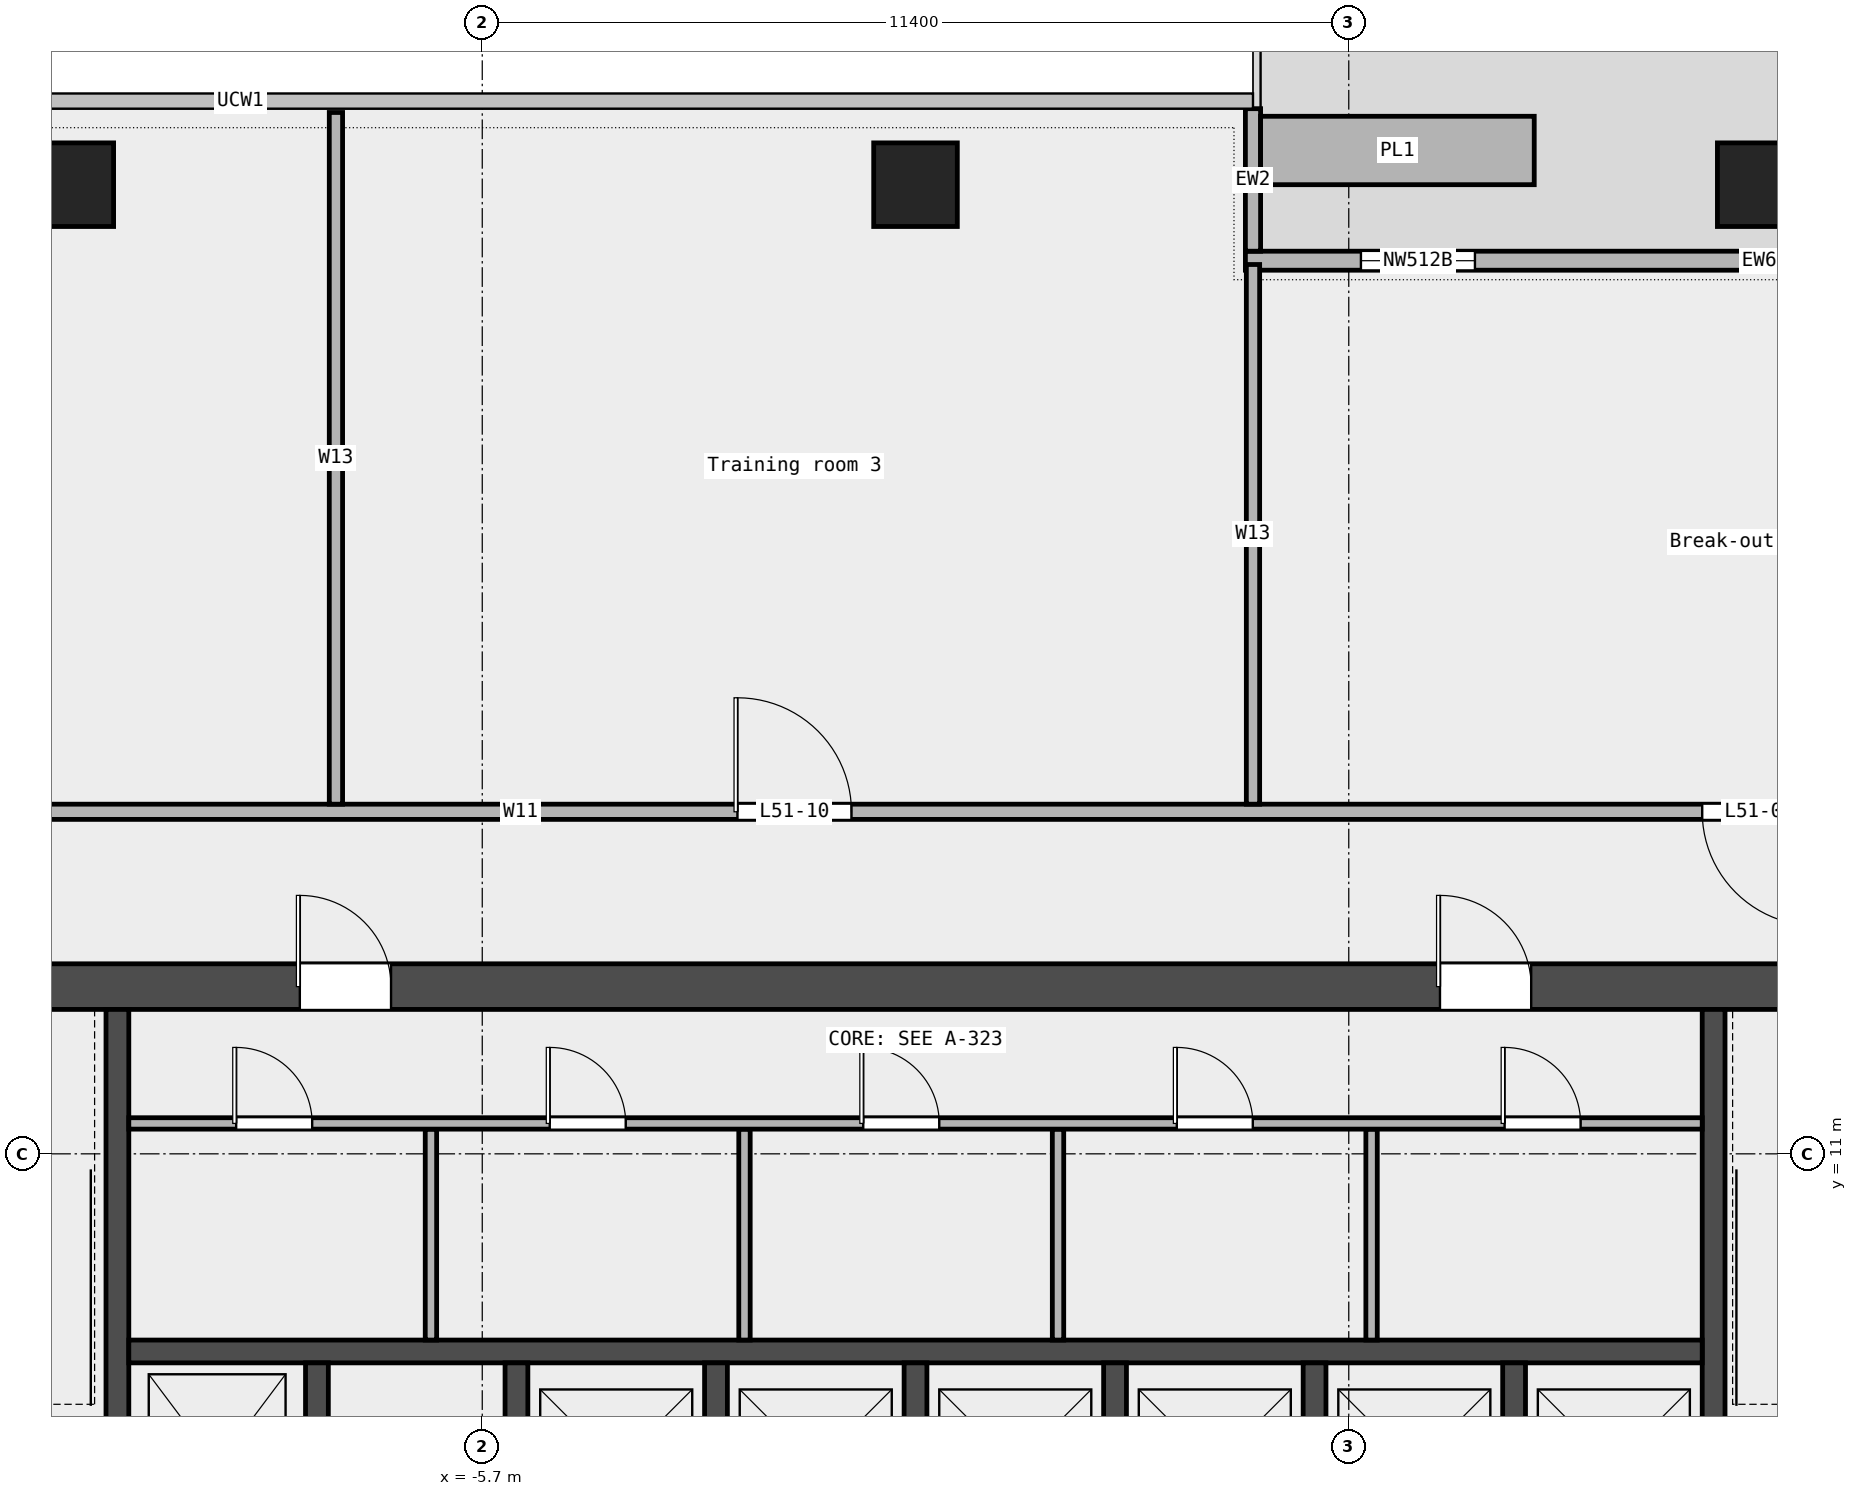
"""IFC4 building model, lengths in metres.
Left out: names, types, materials, properties, quantities, classifications, styles, units other than length and angle.
Written with IfcOpenShell. Run it as: python <this file> out.ifc"""

import sys

from ifc_helpers import new_model, si_unit, direction, frame, frame_2d, origin, origin_2d, place, context, subcontext, project, spatial, rectangle, extrude, element, fill, save


model = new_model("IFC4")
c1 = context("Model", 3, precision=1e-05, world=origin(), true_north=direction((0.0, 1.0)))
c2 = subcontext(c1, "Body", "Model", "MODEL_VIEW")
j1 = project(units=[si_unit("LENGTHUNIT", "METRE"), si_unit("PLANEANGLEUNIT", "RADIAN")], contexts=[c1])
p1 = place(None, origin())
s1 = spatial("IfcSite", under=j1, at=p1, CompositionType="ELEMENT")
p2 = place(p1, origin())
s2 = spatial("IfcBuilding", under=s1, at=p2, CompositionType="ELEMENT")
p3 = place(p2, frame((0.0, 0.0, 239.0)))
s3 = spatial("IfcBuildingStorey", under=s2, at=p3, CompositionType="ELEMENT", Elevation=239.0)
for number, where, z_axis, x_axis in (
    (1, (11.1, 23.75, 0.0), (0.0, 0.0, 1.0), (1.0, 0.0, 0.0)),
    (2, (0.0, 23.75, 0.0), (0.0, 0.0, 1.0), (1.0, 0.0, 0.0)),
    (3, (-11.1, 23.75, 0.0), (0.0, 0.0, 1.0), (1.0, 0.0, 0.0)),
):
    element("IfcColumn", number, at=place(p3, frame(where, z_axis=z_axis, x_axis=x_axis)), inside=s3, PredefinedType="COLUMN", context=c2, shape_type="SweptSolid", body=[
        extrude(rectangle(XDim=1.1, YDim=1.1, at=origin_2d()), origin(), (0.0, 0.0, 1.0), 3.6),
    ])
p4 = place(p3, frame((17.86, 22.75, 0.0), z_axis=(0.0, 0.0, 1.0), x_axis=(-1.0, 0.0, 0.0)))
e4 = element("IfcWall", 4, at=p4, inside=s3, PredefinedType="STANDARD", context=c2, shape_type="SweptSolid", body=[
    extrude(rectangle(XDim=13.52, YDim=0.25, at=frame_2d((6.76, 0.0))), origin(), (0.0, 0.0, 1.0), 3.6),
])
p5 = place(p4, frame((1.5, 0.0, 0.45)))
e5 = element("IfcOpeningElement", 5, at=p5, cuts=e4, PredefinedType="OPENING", context=c2, shape_type="SweptSolid", body=[
    extrude(rectangle(XDim=1.5, YDim=2.4, at=frame_2d((0.75, 1.2))), frame((0.0, 0.137, 0.0), z_axis=(0.0, -1.0, 0.0), x_axis=(1.0, 0.0, 0.0)), (0.0, 0.0, 1.0), 0.274),
])
p6 = place(p4, frame((4.0, 0.0, 0.0)))
e6 = element("IfcOpeningElement", 6, at=p6, cuts=e4, PredefinedType="OPENING", context=c2, shape_type="SweptSolid", body=[
    extrude(rectangle(XDim=1.8, YDim=2.4, at=frame_2d((0.9, 1.2))), frame((0.0, 0.137, 0.0), z_axis=(0.0, -1.0, 0.0), x_axis=(1.0, 0.0, 0.0)), (0.0, 0.0, 1.0), 0.274),
])
p7 = place(p4, frame((10.5, 0.0, 0.45)))
e7 = element("IfcOpeningElement", 7, at=p7, cuts=e4, PredefinedType="OPENING", context=c2, shape_type="SweptSolid", body=[
    extrude(rectangle(XDim=1.5, YDim=2.4, at=frame_2d((0.75, 1.2))), frame((0.0, 0.137, 0.0), z_axis=(0.0, -1.0, 0.0), x_axis=(1.0, 0.0, 0.0)), (0.0, 0.0, 1.0), 0.274),
])
p8 = place(p3, frame((4.44, 24.75, 0.0), z_axis=(0.0, 0.0, 1.0), x_axis=(0.0, -1.0, 0.0)))
e8 = element("IfcWall", 8, at=p8, inside=s3, PredefinedType="STANDARD", context=c2, shape_type="SweptSolid", body=[
    extrude(rectangle(XDim=1.875, YDim=0.2, at=frame_2d((0.938, 0.0))), origin(), (0.0, 0.0, 1.0), 3.6),
])
p9 = place(p3, frame((8.14, 24.2, 0.0), z_axis=(0.0, 0.0, 1.0), x_axis=(-1.0, 0.0, 0.0)))
e9 = element("IfcWall", 9, at=p9, inside=s3, PredefinedType="STANDARD", context=c2, shape_type="SweptSolid", body=[
    extrude(rectangle(XDim=3.6, YDim=0.9, at=frame_2d((1.8, 0.0))), origin(), (0.0, 0.0, 1.0), 0.7),
])
p10 = place(p3, frame((-28.15, 15.5, 0.0), z_axis=(0.0, 0.0, 1.0), x_axis=(1.0, 0.0, 0.0)))
e10 = element("IfcWall", 10, at=p10, inside=s3, PredefinedType="PARTITIONING", context=c2, shape_type="SweptSolid", body=[
    extrude(rectangle(XDim=45.91, YDim=0.2, at=frame_2d((22.955, 0.0))), origin(), (0.0, 0.0, 1.0), 3.6),
])
p11 = place(p10, frame((38.5, 0.0, 0.0)))
e11 = element("IfcOpeningElement", 11, at=p11, cuts=e10, PredefinedType="OPENING", context=c2, shape_type="SweptSolid", body=[
    extrude(rectangle(XDim=1.5, YDim=2.1, at=frame_2d((0.75, 1.05))), frame((0.0, 0.112, 0.0), z_axis=(0.0, -1.0, 0.0), x_axis=(1.0, 0.0, 0.0)), (0.0, 0.0, 1.0), 0.224),
])
p12 = place(p10, frame((9.462, 0.0, 0.0)))
e12 = element("IfcOpeningElement", 12, at=p12, cuts=e10, PredefinedType="OPENING", context=c2, shape_type="SweptSolid", body=[
    extrude(rectangle(XDim=1.8, YDim=2.1, at=frame_2d((0.9, 1.05))), frame((0.0, 0.112, 0.0), z_axis=(0.0, -1.0, 0.0), x_axis=(1.0, 0.0, 0.0)), (0.0, 0.0, 1.0), 0.224),
])
p13 = place(p10, frame((25.808, 0.0, 0.0)))
e13 = element("IfcOpeningElement", 13, at=p13, cuts=e10, PredefinedType="OPENING", context=c2, shape_type="SweptSolid", body=[
    extrude(rectangle(XDim=1.5, YDim=2.1, at=frame_2d((0.75, 1.05))), frame((0.0, 0.112, 0.0), z_axis=(0.0, -1.0, 0.0), x_axis=(1.0, 0.0, 0.0)), (0.0, 0.0, 1.0), 0.224),
])
p14 = place(p3, frame((-7.625, 15.6, 0.0), z_axis=(0.0, 0.0, 1.0), x_axis=(0.0, 1.0, 0.0)))
e14 = element("IfcWall", 14, at=p14, inside=s3, PredefinedType="PARTITIONING", context=c2, shape_type="SweptSolid", body=[
    extrude(rectangle(XDim=9.1, YDim=0.175, at=frame_2d((4.55, 0.0))), origin(), (0.0, 0.0, 1.0), 3.6),
])
p15 = place(p3, frame((4.44, 15.6, 0.0), z_axis=(0.0, 0.0, 1.0), x_axis=(0.0, 1.0, 0.0)))
e15 = element("IfcWall", 15, at=p15, inside=s3, PredefinedType="PARTITIONING", context=c2, shape_type="SweptSolid", body=[
    extrude(rectangle(XDim=7.1, YDim=0.175, at=frame_2d((3.55, 0.0))), origin(), (0.0, 0.0, 1.0), 3.6),
])
p16 = place(p3, frame((-14.4, 13.2, 0.0), z_axis=(0.0, 0.0, 1.0), x_axis=(1.0, 0.0, 0.0)))
e16 = element("IfcWall", 16, at=p16, inside=s3, PredefinedType="SHEAR", context=c2, shape_type="SweptSolid", body=[
    extrude(rectangle(XDim=28.8, YDim=0.6, at=frame_2d((14.4, 0.0))), origin(), (0.0, 0.0, 1.0), 3.7),
])
p17 = place(p16, frame((6.3, 0.0, 0.0)))
e17 = element("IfcOpeningElement", 17, at=p17, cuts=e16, PredefinedType="OPENING", context=c2, shape_type="SweptSolid", body=[
    extrude(rectangle(XDim=1.2, YDim=2.1, at=frame_2d((0.6, 1.05))), frame((0.0, 0.312, 0.0), z_axis=(0.0, -1.0, 0.0), x_axis=(1.0, 0.0, 0.0)), (0.0, 0.0, 1.0), 0.624),
])
p18 = place(p16, frame((21.3, 0.0, 0.0)))
e18 = element("IfcOpeningElement", 18, at=p18, cuts=e16, PredefinedType="OPENING", context=c2, shape_type="SweptSolid", body=[
    extrude(rectangle(XDim=1.2, YDim=2.1, at=frame_2d((0.6, 1.05))), frame((0.0, 0.312, 0.0), z_axis=(0.0, -1.0, 0.0), x_axis=(1.0, 0.0, 0.0)), (0.0, 0.0, 1.0), 0.624),
])
for number, where, z_axis, x_axis in (
    (19, (-10.5, 5.25, 0.0), (0.0, 0.0, 1.0), (0.0, 1.0, 0.0)),
    (20, (10.5, 5.25, 0.0), (0.0, 0.0, 1.0), (0.0, 1.0, 0.0)),
):
    element("IfcWall", number, at=place(p3, frame(where, z_axis=z_axis, x_axis=x_axis)), inside=s3, PredefinedType="SHEAR", context=c2, shape_type="SweptSolid", body=[
        extrude(rectangle(XDim=7.65, YDim=0.3, at=frame_2d((3.825, 0.0))), origin(), (0.0, 0.0, 1.0), 3.7),
    ])
p19 = place(p3, frame((-10.35, 8.4, 0.0), z_axis=(0.0, 0.0, 1.0), x_axis=(1.0, 0.0, 0.0)))
e21 = element("IfcWall", 21, at=p19, inside=s3, PredefinedType="SOLIDWALL", context=c2, shape_type="SweptSolid", body=[
    extrude(rectangle(XDim=20.7, YDim=0.3, at=frame_2d((10.35, 0.0))), origin(), (0.0, 0.0, 1.0), 3.7),
])
for number, where, z_axis, x_axis in (
    (22, (-7.875, 5.55, 0.0), (0.0, 0.0, 1.0), (0.0, 1.0, 0.0)),
    (23, (-5.25, 5.55, 0.0), (0.0, 0.0, 1.0), (0.0, 1.0, 0.0)),
    (24, (-2.625, 5.55, 0.0), (0.0, 0.0, 1.0), (0.0, 1.0, 0.0)),
    (25, (0.0, 5.55, 0.0), (0.0, 0.0, 1.0), (0.0, 1.0, 0.0)),
    (26, (2.625, 5.55, 0.0), (0.0, 0.0, 1.0), (0.0, 1.0, 0.0)),
    (27, (5.25, 5.55, 0.0), (0.0, 0.0, 1.0), (0.0, 1.0, 0.0)),
    (28, (7.875, 5.55, 0.0), (0.0, 0.0, 1.0), (0.0, 1.0, 0.0)),
):
    element("IfcWall", number, at=place(p3, frame(where, z_axis=z_axis, x_axis=x_axis)), inside=s3, PredefinedType="SOLIDWALL", context=c2, shape_type="SweptSolid", body=[
        extrude(rectangle(XDim=2.7, YDim=0.3, at=frame_2d((1.35, 0.0))), origin(), (0.0, 0.0, 1.0), 3.7),
    ])
for number, where, z_axis, x_axis in (
    (29, (-6.375, 8.55, 0.0), (0.0, 0.0, 1.0), (0.0, 1.0, 0.0)),
    (30, (-2.25, 8.55, 0.0), (0.0, 0.0, 1.0), (0.0, 1.0, 0.0)),
    (31, (1.875, 8.55, 0.0), (0.0, 0.0, 1.0), (0.0, 1.0, 0.0)),
    (32, (6.0, 8.55, 0.0), (0.0, 0.0, 1.0), (0.0, 1.0, 0.0)),
):
    element("IfcWall", number, at=place(p3, frame(where, z_axis=z_axis, x_axis=x_axis)), inside=s3, PredefinedType="PARTITIONING", context=c2, shape_type="SweptSolid", body=[
        extrude(rectangle(XDim=2.775, YDim=0.15, at=frame_2d((1.387, 0.0))), origin(), (0.0, 0.0, 1.0), 3.7),
    ])
p20 = place(p3, frame((-10.35, 11.4, 0.0), z_axis=(0.0, 0.0, 1.0), x_axis=(1.0, 0.0, 0.0)))
e33 = element("IfcWall", 33, at=p20, inside=s3, PredefinedType="PARTITIONING", context=c2, shape_type="SweptSolid", body=[
    extrude(rectangle(XDim=20.7, YDim=0.15, at=frame_2d((10.35, 0.0))), origin(), (0.0, 0.0, 1.0), 3.7),
])
p21 = place(p20, frame((1.413, 0.0, 0.0)))
e34 = element("IfcOpeningElement", 34, at=p21, cuts=e33, PredefinedType="OPENING", context=c2, shape_type="SweptSolid", body=[
    extrude(rectangle(XDim=1.0, YDim=2.1, at=frame_2d((0.5, 1.05))), frame((0.0, 0.087, 0.0), z_axis=(0.0, -1.0, 0.0), x_axis=(1.0, 0.0, 0.0)), (0.0, 0.0, 1.0), 0.174),
])
p22 = place(p20, frame((5.538, 0.0, 0.0)))
e35 = element("IfcOpeningElement", 35, at=p22, cuts=e33, PredefinedType="OPENING", context=c2, shape_type="SweptSolid", body=[
    extrude(rectangle(XDim=1.0, YDim=2.1, at=frame_2d((0.5, 1.05))), frame((0.0, 0.087, 0.0), z_axis=(0.0, -1.0, 0.0), x_axis=(1.0, 0.0, 0.0)), (0.0, 0.0, 1.0), 0.174),
])
p23 = place(p20, frame((9.663, 0.0, 0.0)))
e36 = element("IfcOpeningElement", 36, at=p23, cuts=e33, PredefinedType="OPENING", context=c2, shape_type="SweptSolid", body=[
    extrude(rectangle(XDim=1.0, YDim=2.1, at=frame_2d((0.5, 1.05))), frame((0.0, 0.087, 0.0), z_axis=(0.0, -1.0, 0.0), x_axis=(1.0, 0.0, 0.0)), (0.0, 0.0, 1.0), 0.174),
])
p24 = place(p20, frame((13.788, 0.0, 0.0)))
e37 = element("IfcOpeningElement", 37, at=p24, cuts=e33, PredefinedType="OPENING", context=c2, shape_type="SweptSolid", body=[
    extrude(rectangle(XDim=1.0, YDim=2.1, at=frame_2d((0.5, 1.05))), frame((0.0, 0.087, 0.0), z_axis=(0.0, -1.0, 0.0), x_axis=(1.0, 0.0, 0.0)), (0.0, 0.0, 1.0), 0.174),
])
p25 = place(p20, frame((18.1, 0.0, 0.0)))
e38 = element("IfcOpeningElement", 38, at=p25, cuts=e33, PredefinedType="OPENING", context=c2, shape_type="SweptSolid", body=[
    extrude(rectangle(XDim=1.0, YDim=2.1, at=frame_2d((0.5, 1.05))), frame((0.0, 0.087, 0.0), z_axis=(0.0, -1.0, 0.0), x_axis=(1.0, 0.0, 0.0)), (0.0, 0.0, 1.0), 0.174),
])
p26 = place(p7, origin())
e39 = element("IfcWindow", 39, at=p26, inside=s3, PartitioningType="SINGLE_PANEL", PredefinedType="WINDOW", context=c2, shape_type="SweptSolid", body=[
    extrude(rectangle(XDim=1.5, YDim=2.4, at=frame_2d((0.75, 1.2))), frame((0.0, 0.03, 0.0), z_axis=(0.0, -1.0, 0.0), x_axis=(1.0, 0.0, 0.0)), (0.0, 0.0, 1.0), 0.06),
])
fill(e7, e39)
p27 = place(p11, origin())
e40 = element("IfcDoor", 40, at=p27, inside=s3, OperationType="DOUBLE_DOOR_SINGLE_SWING", PredefinedType="DOOR", context=c2, shape_type="SweptSolid", body=[
    extrude(rectangle(XDim=1.5, YDim=2.1, at=frame_2d((0.75, 1.05))), frame((0.0, 0.025, 0.0), z_axis=(0.0, -1.0, 0.0), x_axis=(1.0, 0.0, 0.0)), (0.0, 0.0, 1.0), 0.05),
])
fill(e11, e40)
p28 = place(p13, origin())
e41 = element("IfcDoor", 41, at=p28, inside=s3, OperationType="DOUBLE_DOOR_SINGLE_SWING", PredefinedType="DOOR", context=c2, shape_type="SweptSolid", body=[
    extrude(rectangle(XDim=1.5, YDim=2.1, at=frame_2d((0.75, 1.05))), frame((0.0, 0.025, 0.0), z_axis=(0.0, -1.0, 0.0), x_axis=(1.0, 0.0, 0.0)), (0.0, 0.0, 1.0), 0.05),
])
fill(e13, e41)
p29 = place(p21, origin())
e42 = element("IfcDoor", 42, at=p29, inside=s3, OperationType="SINGLE_SWING_LEFT", PredefinedType="DOOR", context=c2, shape_type="SweptSolid", body=[
    extrude(rectangle(XDim=1.0, YDim=2.1, at=frame_2d((0.5, 1.05))), frame((0.0, 0.025, 0.0), z_axis=(0.0, -1.0, 0.0), x_axis=(1.0, 0.0, 0.0)), (0.0, 0.0, 1.0), 0.05),
])
fill(e34, e42)
p30 = place(p22, origin())
e43 = element("IfcDoor", 43, at=p30, inside=s3, OperationType="SINGLE_SWING_LEFT", PredefinedType="DOOR", context=c2, shape_type="SweptSolid", body=[
    extrude(rectangle(XDim=1.0, YDim=2.1, at=frame_2d((0.5, 1.05))), frame((0.0, 0.025, 0.0), z_axis=(0.0, -1.0, 0.0), x_axis=(1.0, 0.0, 0.0)), (0.0, 0.0, 1.0), 0.05),
])
fill(e35, e43)
p31 = place(p23, origin())
e44 = element("IfcDoor", 44, at=p31, inside=s3, OperationType="SINGLE_SWING_LEFT", PredefinedType="DOOR", context=c2, shape_type="SweptSolid", body=[
    extrude(rectangle(XDim=1.0, YDim=2.1, at=frame_2d((0.5, 1.05))), frame((0.0, 0.025, 0.0), z_axis=(0.0, -1.0, 0.0), x_axis=(1.0, 0.0, 0.0)), (0.0, 0.0, 1.0), 0.05),
])
fill(e36, e44)
p32 = place(p24, origin())
e45 = element("IfcDoor", 45, at=p32, inside=s3, OperationType="SINGLE_SWING_LEFT", PredefinedType="DOOR", context=c2, shape_type="SweptSolid", body=[
    extrude(rectangle(XDim=1.0, YDim=2.1, at=frame_2d((0.5, 1.05))), frame((0.0, 0.025, 0.0), z_axis=(0.0, -1.0, 0.0), x_axis=(1.0, 0.0, 0.0)), (0.0, 0.0, 1.0), 0.05),
])
fill(e37, e45)
p33 = place(p25, origin())
e46 = element("IfcDoor", 46, at=p33, inside=s3, OperationType="SINGLE_SWING_LEFT", PredefinedType="DOOR", context=c2, shape_type="SweptSolid", body=[
    extrude(rectangle(XDim=1.0, YDim=2.1, at=frame_2d((0.5, 1.05))), frame((0.0, 0.025, 0.0), z_axis=(0.0, -1.0, 0.0), x_axis=(1.0, 0.0, 0.0)), (0.0, 0.0, 1.0), 0.05),
])
fill(e38, e46)
p34 = place(p17, origin())
e47 = element("IfcDoor", 47, at=p34, inside=s3, OperationType="SINGLE_SWING_LEFT", PredefinedType="DOOR", context=c2, shape_type="SweptSolid", body=[
    extrude(rectangle(XDim=1.2, YDim=2.1, at=frame_2d((0.6, 1.05))), frame((0.0, 0.025, 0.0), z_axis=(0.0, -1.0, 0.0), x_axis=(1.0, 0.0, 0.0)), (0.0, 0.0, 1.0), 0.05),
])
fill(e17, e47)
p35 = place(p18, origin())
e48 = element("IfcDoor", 48, at=p35, inside=s3, OperationType="SINGLE_SWING_RIGHT", PredefinedType="DOOR", context=c2, shape_type="SweptSolid", body=[
    extrude(rectangle(XDim=1.2, YDim=2.1, at=frame_2d((0.6, 1.05))), frame((0.0, 0.025, 0.0), z_axis=(0.0, -1.0, 0.0), x_axis=(1.0, 0.0, 0.0)), (0.0, 0.0, 1.0), 0.05),
])
fill(e18, e48)
save(model, sys.argv[1])
